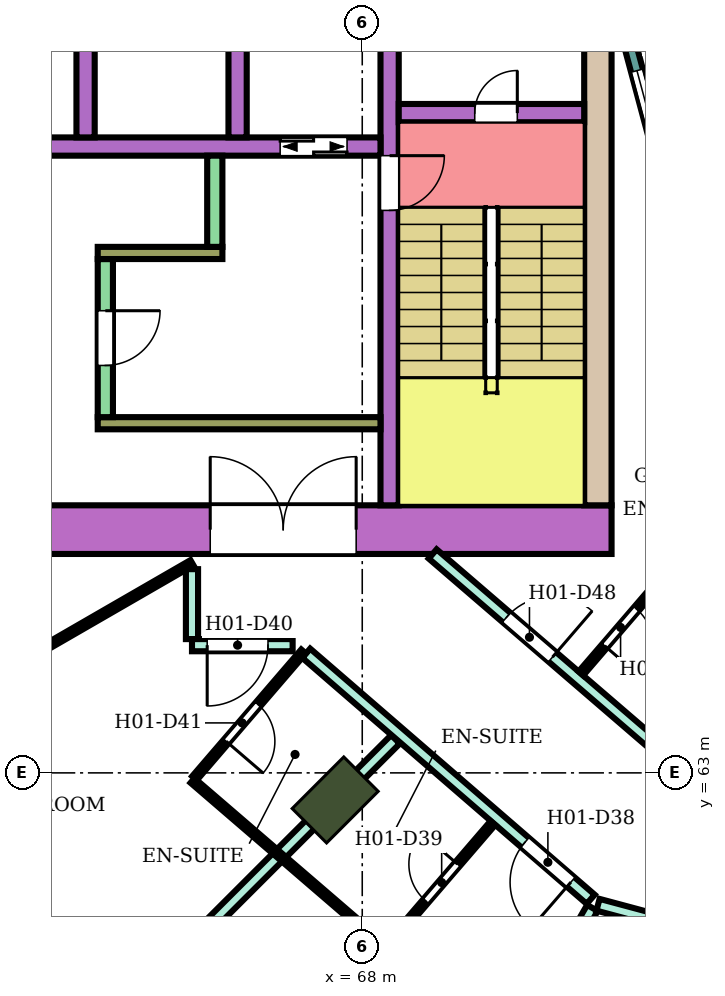
"""IFC4 building model, lengths in metres.
Left out: names, types, materials, properties, quantities, classifications, styles, units other than length and angle.
Written with IfcOpenShell. Run it as: python <this file> out.ifc"""

import sys

from ifc_helpers import new_model, si_unit, direction, frame, frame_2d, origin, origin_2d, place, context, subcontext, project, spatial, rectangle, extrude, element, fill, save


model = new_model("IFC4")
c1 = context("Model", 3, precision=1e-05, world=origin(), true_north=direction((0.0, 1.0)))
c2 = subcontext(c1, "Body", "Model", "MODEL_VIEW")
j1 = project(units=[si_unit("LENGTHUNIT", "METRE"), si_unit("PLANEANGLEUNIT", "RADIAN")], contexts=[c1])
p1 = place(None, origin())
s1 = spatial("IfcSite", under=j1, at=p1, CompositionType="ELEMENT")
p2 = place(p1, origin())
s2 = spatial("IfcBuilding", under=s1, at=p2, CompositionType="ELEMENT")
p3 = place(p2, frame((0.0, 0.0, 28.8)))
s3 = spatial("IfcBuildingStorey", under=s2, at=p3, CompositionType="ELEMENT", Elevation=28.8)
p4 = place(p3, frame((67.555, 62.555, 0.0), z_axis=(0.0, 0.0, 1.0), x_axis=(-0.707106781187, -0.707106781187, 0.0)))
e1 = element("IfcColumn", 1, at=p4, inside=s3, PredefinedType="COLUMN", context=c2, shape_type="SweptSolid", body=[
    extrude(rectangle(XDim=1.2, YDim=0.8, at=origin_2d()), origin(), (0.0, 0.0, 1.0), 3.8),
])
p5 = place(p3, frame((72.1, 67.0, 0.0), z_axis=(0.0, 0.0, 1.0), x_axis=(-1.0, 0.0, 0.0)))
e2 = element("IfcWall", 2, at=p5, inside=s3, PredefinedType="SHEAR", context=c2, shape_type="SweptSolid", body=[
    extrude(rectangle(XDim=14.7, YDim=0.8, at=frame_2d((7.35, 0.0))), origin(), (0.0, 0.0, 1.0), 3.48),
])
p6 = place(p5, frame((4.2, 0.0, 0.0)))
e3 = element("IfcOpeningElement", 3, at=p6, cuts=e2, PredefinedType="OPENING", context=c2, shape_type="SweptSolid", body=[
    extrude(rectangle(XDim=2.4, YDim=2.4, at=frame_2d((1.2, 1.2))), frame((0.0, 0.41, 0.0), z_axis=(0.0, -1.0, 0.0), x_axis=(1.0, 0.0, 0.0)), (0.0, 0.0, 1.0), 0.82),
])
p7 = place(p3, frame((71.875, 75.0, 0.0), z_axis=(0.0, 0.0, 1.0), x_axis=(0.0, -1.0, 0.0)))
e4 = element("IfcWall", 4, at=p7, inside=s3, PredefinedType="SHEAR", context=c2, shape_type="SweptSolid", body=[
    extrude(rectangle(XDim=7.6, YDim=0.45, at=frame_2d((3.8, 0.0))), origin(), (0.0, 0.0, 1.0), 3.48),
])
p8 = place(p3, frame((68.45, 75.0, 0.0), z_axis=(0.0, 0.0, 1.0), x_axis=(0.0, -1.0, 0.0)))
e5 = element("IfcWall", 5, at=p8, inside=s3, PredefinedType="SHEAR", context=c2, shape_type="SweptSolid", body=[
    extrude(rectangle(XDim=7.6, YDim=0.3, at=frame_2d((3.8, 0.0))), origin(), (0.0, 0.0, 1.0), 3.48),
])
p9 = place(p8, frame((1.85, 0.0, 0.0)))
e6 = element("IfcOpeningElement", 6, at=p9, cuts=e5, PredefinedType="OPENING", context=c2, shape_type="SweptSolid", body=[
    extrude(rectangle(XDim=0.9, YDim=2.1, at=frame_2d((0.45, 1.05))), frame((0.0, 0.16, 0.0), z_axis=(0.0, -1.0, 0.0), x_axis=(1.0, 0.0, 0.0)), (0.0, 0.0, 1.0), 0.32),
])
p10 = place(p3, frame((71.65, 73.85, 0.0), z_axis=(0.0, 0.0, 1.0), x_axis=(-1.0, 0.0, 0.0)))
e7 = element("IfcWall", 7, at=p10, inside=s3, PredefinedType="SHEAR", context=c2, shape_type="SweptSolid", body=[
    extrude(rectangle(XDim=3.05, YDim=0.3, at=frame_2d((1.525, 0.0))), origin(), (0.0, 0.0, 1.0), 3.48),
])
p11 = place(p10, frame((1.1, 0.0, 0.0)))
e8 = element("IfcOpeningElement", 8, at=p11, cuts=e7, PredefinedType="OPENING", context=c2, shape_type="SweptSolid", body=[
    extrude(rectangle(XDim=0.7, YDim=2.0, at=frame_2d((0.35, 1.0))), frame((0.0, 0.16, 0.0), z_axis=(0.0, -1.0, 0.0), x_axis=(1.0, 0.0, 0.0)), (0.0, 0.0, 1.0), 0.32),
])
p12 = place(p3, frame((68.3, 73.3, 0.0), z_axis=(0.0, 0.0, 1.0), x_axis=(-1.0, 0.0, 0.0)))
e9 = element("IfcWall", 9, at=p12, inside=s3, PredefinedType="SHEAR", context=c2, shape_type="SweptSolid", body=[
    extrude(rectangle(XDim=10.9, YDim=0.3, at=frame_2d((5.45, 0.0))), origin(), (0.0, 0.0, 1.0), 3.48),
])
p13 = place(p12, frame((0.55, 0.0, 0.0)))
e10 = element("IfcOpeningElement", 10, at=p13, cuts=e9, PredefinedType="OPENING", context=c2, shape_type="SweptSolid", body=[
    extrude(rectangle(XDim=1.1, YDim=2.1, at=frame_2d((0.55, 1.05))), frame((0.0, 0.16, 0.0), z_axis=(0.0, -1.0, 0.0), x_axis=(1.0, 0.0, 0.0)), (0.0, 0.0, 1.0), 0.32),
])
p14 = place(p12, frame((8.1, 0.0, 0.0)))
e11 = element("IfcOpeningElement", 11, at=p14, cuts=e9, PredefinedType="OPENING", context=c2, shape_type="SweptSolid", body=[
    extrude(rectangle(XDim=1.0, YDim=2.1, at=frame_2d((0.5, 1.05))), frame((0.0, 0.16, 0.0), z_axis=(0.0, -1.0, 0.0), x_axis=(1.0, 0.0, 0.0)), (0.0, 0.0, 1.0), 0.32),
])
for number, where, z_axis, x_axis in (
    (12, (65.95, 76.0, 0.0), (0.0, 0.0, 1.0), (0.0, -1.0, 0.0)),
    (13, (63.45, 76.0, 0.0), (0.0, 0.0, 1.0), (0.0, -1.0, 0.0)),
):
    element("IfcWall", number, at=place(p3, frame(where, z_axis=z_axis, x_axis=x_axis)), inside=s3, PredefinedType="SHEAR", context=c2, shape_type="SweptSolid", body=[
        extrude(rectangle(XDim=2.55, YDim=0.3, at=frame_2d((1.275, 0.0))), origin(), (0.0, 0.0, 1.0), 3.48),
    ])
p15 = place(p3, frame((68.3, 68.75, 0.0), z_axis=(0.0, 0.0, 1.0), x_axis=(-1.0, 0.0, 0.0)))
e14 = element("IfcWall", 14, at=p15, inside=s3, PredefinedType="SHEAR", context=c2, shape_type="SweptSolid", body=[
    extrude(rectangle(XDim=4.65, YDim=0.2, at=frame_2d((2.325, 0.0))), origin(), (0.0, 0.0, 1.0), 3.48),
])
p16 = place(p3, frame((63.775, 71.45, 0.0), z_axis=(0.0, 0.0, 1.0), x_axis=(0.0, -1.0, 0.0)))
e15 = element("IfcWall", 15, at=p16, inside=s3, PredefinedType="SHEAR", context=c2, shape_type="SweptSolid", body=[
    extrude(rectangle(XDim=2.6, YDim=0.25, at=frame_2d((1.3, 0.0))), origin(), (0.0, 0.0, 1.0), 3.48),
])
p17 = place(p16, frame((0.85, 0.0, 0.0)))
e16 = element("IfcOpeningElement", 16, at=p17, cuts=e15, PredefinedType="OPENING", context=c2, shape_type="SweptSolid", body=[
    extrude(rectangle(XDim=0.9, YDim=2.1, at=frame_2d((0.45, 1.05))), frame((0.0, 0.135, 0.0), z_axis=(0.0, -1.0, 0.0), x_axis=(1.0, 0.0, 0.0)), (0.0, 0.0, 1.0), 0.27),
])
p18 = place(p3, frame((65.7, 71.55, 0.0), z_axis=(0.0, 0.0, 1.0), x_axis=(-1.0, 0.0, 0.0)))
e17 = element("IfcWall", 17, at=p18, inside=s3, PredefinedType="SHEAR", context=c2, shape_type="SweptSolid", body=[
    extrude(rectangle(XDim=2.05, YDim=0.2, at=frame_2d((1.025, 0.0))), origin(), (0.0, 0.0, 1.0), 3.48),
])
p19 = place(p3, frame((65.575, 73.15, 0.0), z_axis=(0.0, 0.0, 1.0), x_axis=(0.0, -1.0, 0.0)))
e18 = element("IfcWall", 18, at=p19, inside=s3, PredefinedType="SHEAR", context=c2, shape_type="SweptSolid", body=[
    extrude(rectangle(XDim=1.5, YDim=0.25, at=frame_2d((0.75, 0.0))), origin(), (0.0, 0.0, 1.0), 3.48),
])
p20 = place(p3, frame((72.396, 75.0, 0.0), z_axis=(0.0, 0.0, 1.0), x_axis=(0.258789828301, -0.965933654434, 0.0)))
e19 = element("IfcWall", 19, at=p20, inside=s3, PredefinedType="NOTDEFINED", context=c2, shape_type="SweptSolid", body=[
    extrude(rectangle(XDim=3.936, YDim=0.2, at=frame_2d((1.968, 0.0))), origin(), (0.0, 0.0, 1.0), 3.8),
])
p21 = place(p20, frame((0.468, 0.0, 0.9)))
e20 = element("IfcOpeningElement", 20, at=p21, cuts=e19, PredefinedType="OPENING", context=c2, shape_type="SweptSolid", body=[
    extrude(rectangle(XDim=3.0, YDim=2.3, at=frame_2d((1.5, 1.15))), frame((0.0, 0.11, 0.0), z_axis=(0.0, -1.0, 0.0), x_axis=(1.0, 0.0, 0.0)), (0.0, 0.0, 1.0), 0.22),
])
p22 = place(p3, frame((63.592, 58.599, 0.0), z_axis=(0.0, 0.0, 1.0), x_axis=(0.707228748718, 0.706984792613, 0.0)))
e21 = element("IfcWall", 21, at=p22, inside=s3, PredefinedType="PARTITIONING", context=c2, shape_type="SweptSolid", body=[
    extrude(rectangle(XDim=7.005, YDim=0.2, at=frame_2d((3.503, 0.0))), origin(), (0.0, 0.0, 1.0), 3.35),
])
p23 = place(p3, frame((65.2, 65.2, 0.0), z_axis=(0.0, 0.0, 1.0), x_axis=(0.0, 1.0, 0.0)))
e22 = element("IfcWall", 22, at=p23, inside=s3, PredefinedType="PARTITIONING", context=c2, shape_type="SweptSolid", body=[
    extrude(rectangle(XDim=1.15, YDim=0.2, at=frame_2d((0.575, 0.0))), origin(), (0.0, 0.0, 1.0), 3.35),
])
p24 = place(p3, frame((65.2, 65.1, 0.0), z_axis=(0.0, 0.0, 1.0), x_axis=(1.0, 0.0, 0.0)))
e23 = element("IfcWall", 23, at=p24, inside=s3, PredefinedType="PARTITIONING", context=c2, shape_type="SweptSolid", body=[
    extrude(rectangle(XDim=1.655, YDim=0.2, at=frame_2d((0.828, 0.0))), origin(), (0.0, 0.0, 1.0), 3.35),
])
p25 = place(p24, frame((0.25, 0.0, 0.0)))
e24 = element("IfcOpeningElement", 24, at=p25, cuts=e23, PredefinedType="OPENING", context=c2, shape_type="SweptSolid", body=[
    extrude(rectangle(XDim=1.0, YDim=2.1, at=frame_2d((0.5, 1.05))), frame((0.0, 0.11, 0.0), z_axis=(0.0, -1.0, 0.0), x_axis=(1.0, 0.0, 0.0)), (0.0, 0.0, 1.0), 0.22),
])
p26 = place(p3, frame((67.078, 64.968, 0.0), z_axis=(0.0, 0.0, 1.0), x_axis=(0.756371089567, -0.654142778656, 0.0)))
e25 = element("IfcWall", 25, at=p26, inside=s3, PredefinedType="PARTITIONING", context=c2, shape_type="SweptSolid", body=[
    extrude(rectangle(XDim=6.185, YDim=0.2, at=frame_2d((3.093, 0.0))), origin(), (0.0, 0.0, 1.0), 3.35),
])
p27 = place(p26, frame((4.755, 0.0, 0.0)))
e26 = element("IfcOpeningElement", 26, at=p27, cuts=e25, PredefinedType="OPENING", context=c2, shape_type="SweptSolid", body=[
    extrude(rectangle(XDim=1.0, YDim=2.1, at=frame_2d((0.5, 1.05))), frame((0.0, 0.11, 0.0), z_axis=(0.0, -1.0, 0.0), x_axis=(1.0, 0.0, 0.0)), (0.0, 0.0, 1.0), 0.22),
])
p28 = place(p3, frame((67.096, 52.662, 0.0), z_axis=(0.0, 0.0, 1.0), x_axis=(0.500242450002, 0.865885379953, 0.0)))
e27 = element("IfcWall", 27, at=p28, inside=s3, PredefinedType="PARTITIONING", context=c2, shape_type="SweptSolid", body=[
    extrude(rectangle(XDim=9.374, YDim=0.2, at=frame_2d((4.687, 0.0))), origin(), (0.0, 0.0, 1.0), 3.35),
])
p29 = place(p3, frame((69.158, 66.6, 0.0), z_axis=(0.0, 0.0, 1.0), x_axis=(0.757976058094, -0.652282373943, 0.0)))
e28 = element("IfcWall", 28, at=p29, inside=s3, PredefinedType="PARTITIONING", context=c2, shape_type="SweptSolid", body=[
    extrude(rectangle(XDim=5.16, YDim=0.2, at=frame_2d((2.58, 0.0))), origin(), (0.0, 0.0, 1.0), 3.35),
])
p30 = place(p29, frame((1.6, 0.0, 0.0)))
e29 = element("IfcOpeningElement", 29, at=p30, cuts=e28, PredefinedType="OPENING", context=c2, shape_type="SweptSolid", body=[
    extrude(rectangle(XDim=1.0, YDim=2.1, at=frame_2d((0.5, 1.05))), frame((0.0, 0.11, 0.0), z_axis=(0.0, -1.0, 0.0), x_axis=(1.0, 0.0, 0.0)), (0.0, 0.0, 1.0), 0.22),
])
p31 = place(p3, frame((71.877, 60.831, 0.0), z_axis=(0.0, 0.0, 1.0), x_axis=(0.965852509869, -0.259092510851, 0.0)))
e30 = element("IfcWall", 30, at=p31, inside=s3, PredefinedType="PARTITIONING", context=c2, shape_type="SweptSolid", body=[
    extrude(rectangle(XDim=8.32, YDim=0.2, at=frame_2d((4.16, 0.0))), origin(), (0.0, 0.0, 1.0), 3.35),
])
p32 = place(p31, frame((6.86, 0.0, 0.0)))
e31 = element("IfcOpeningElement", 31, at=p32, cuts=e30, PredefinedType="OPENING", context=c2, shape_type="SweptSolid", body=[
    extrude(rectangle(XDim=1.0, YDim=2.1, at=frame_2d((0.5, 1.05))), frame((0.0, 0.11, 0.0), z_axis=(0.0, -1.0, 0.0), x_axis=(1.0, 0.0, 0.0)), (0.0, 0.0, 1.0), 0.22),
])
p33 = place(p3, frame((57.659, 62.101, 0.0), z_axis=(0.0, 0.0, 1.0), x_axis=(0.86602264145, 0.500004784474, 0.0)))
e32 = element("IfcWall", 32, at=p33, inside=s3, PredefinedType="PARTITIONING", context=c2, shape_type="SweptSolid", body=[
    extrude(rectangle(XDim=8.708, YDim=0.1, at=frame_2d((4.354, 0.0))), origin(), (0.0, 0.0, 1.0), 3.35),
])
p34 = place(p33, frame((3.929, 0.0, 0.0)))
e33 = element("IfcOpeningElement", 33, at=p34, cuts=e32, PredefinedType="OPENING", context=c2, shape_type="SweptSolid", body=[
    extrude(rectangle(XDim=0.9, YDim=2.1, at=frame_2d((0.45, 1.05))), frame((0.0, 0.06, 0.0), z_axis=(0.0, -1.0, 0.0), x_axis=(1.0, 0.0, 0.0)), (0.0, 0.0, 1.0), 0.12),
])
p35 = place(p3, frame((65.242, 62.912, 0.0), z_axis=(0.0, 0.0, 1.0), x_axis=(0.652069888227, 0.758158862553, 0.0)))
e34 = element("IfcWall", 34, at=p35, inside=s3, PredefinedType="PARTITIONING", context=c2, shape_type="SweptSolid", body=[
    extrude(rectangle(XDim=2.75, YDim=0.1, at=frame_2d((1.375, 0.0))), origin(), (0.0, 0.0, 1.0), 3.35),
])
p36 = place(p35, frame((0.8, 0.0, 0.0)))
e35 = element("IfcOpeningElement", 35, at=p36, cuts=e34, PredefinedType="OPENING", context=c2, shape_type="SweptSolid", body=[
    extrude(rectangle(XDim=0.8, YDim=2.1, at=frame_2d((0.4, 1.05))), frame((0.0, 0.06, 0.0), z_axis=(0.0, -1.0, 0.0), x_axis=(1.0, 0.0, 0.0)), (0.0, 0.0, 1.0), 0.12),
])
p37 = place(p3, frame((65.209, 62.875, 0.0), z_axis=(0.0, 0.0, 1.0), x_axis=(0.757930378138, -0.652335451969, 0.0)))
e36 = element("IfcWall", 36, at=p37, inside=s3, PredefinedType="PARTITIONING", context=c2, shape_type="SweptSolid", body=[
    extrude(rectangle(XDim=4.15, YDim=0.1, at=frame_2d((2.075, 0.0))), origin(), (0.0, 0.0, 1.0), 3.35),
])
p38 = place(p3, frame((68.393, 60.135, 0.0), z_axis=(0.0, 0.0, 1.0), x_axis=(0.652061182569, 0.758166349944, 0.0)))
e37 = element("IfcWall", 37, at=p38, inside=s3, PredefinedType="PARTITIONING", context=c2, shape_type="SweptSolid", body=[
    extrude(rectangle(XDim=2.69, YDim=0.1, at=frame_2d((1.345, 0.0))), origin(), (0.0, 0.0, 1.0), 3.35),
])
p39 = place(p38, frame((1.0, 0.0, 0.0)))
e38 = element("IfcOpeningElement", 38, at=p39, cuts=e37, PredefinedType="OPENING", context=c2, shape_type="SweptSolid", body=[
    extrude(rectangle(XDim=0.8, YDim=2.1, at=frame_2d((0.4, 1.05))), frame((0.0, 0.06, 0.0), z_axis=(0.0, -1.0, 0.0), x_axis=(1.0, 0.0, 0.0)), (0.0, 0.0, 1.0), 0.12),
])
p40 = place(p3, frame((71.596, 64.635, 0.0), z_axis=(0.0, 0.0, 1.0), x_axis=(0.652285007511, 0.757973791748, 0.0)))
e39 = element("IfcWall", 39, at=p40, inside=s3, PredefinedType="PARTITIONING", context=c2, shape_type="SweptSolid", body=[
    extrude(rectangle(XDim=2.65, YDim=0.1, at=frame_2d((1.325, 0.0))), origin(), (0.0, 0.0, 1.0), 3.35),
])
p41 = place(p40, frame((0.6, 0.0, 0.0)))
e40 = element("IfcOpeningElement", 40, at=p41, cuts=e39, PredefinedType="OPENING", context=c2, shape_type="SweptSolid", body=[
    extrude(rectangle(XDim=0.8, YDim=2.1, at=frame_2d((0.4, 1.05))), frame((0.0, 0.06, 0.0), z_axis=(0.0, -1.0, 0.0), x_axis=(1.0, 0.0, 0.0)), (0.0, 0.0, 1.0), 0.12),
])
p42 = place(p21, origin())
e41 = element("IfcWindow", 41, at=p42, inside=s3, PartitioningType="SINGLE_PANEL", PredefinedType="WINDOW", context=c2, shape_type="SweptSolid", body=[
    extrude(rectangle(XDim=3.0, YDim=2.3, at=frame_2d((1.5, 1.15))), frame((0.0, 0.03, 0.0), z_axis=(0.0, -1.0, 0.0), x_axis=(1.0, 0.0, 0.0)), (0.0, 0.0, 1.0), 0.06),
])
fill(e20, e41)
p43 = place(p27, frame((1.0, 0.0, 0.0), z_axis=(0.0, 0.0, 1.0), x_axis=(-1.0, 0.0, 0.0)))
e42 = element("IfcDoor", 42, at=p43, inside=s3, OperationType="SINGLE_SWING_LEFT", PredefinedType="DOOR", context=c2, shape_type="SweptSolid", body=[
    extrude(rectangle(XDim=1.0, YDim=2.1, at=frame_2d((0.5, 1.05))), frame((0.0, 0.025, 0.0), z_axis=(0.0, -1.0, 0.0), x_axis=(1.0, 0.0, 0.0)), (0.0, 0.0, 1.0), 0.05),
])
fill(e26, e42)
p44 = place(p39, origin())
e43 = element("IfcDoor", 43, at=p44, inside=s3, OperationType="SINGLE_SWING_RIGHT", PredefinedType="DOOR", context=c2, shape_type="SweptSolid", body=[
    extrude(rectangle(XDim=0.8, YDim=2.1, at=frame_2d((0.4, 1.05))), frame((0.0, 0.025, 0.0), z_axis=(0.0, -1.0, 0.0), x_axis=(1.0, 0.0, 0.0)), (0.0, 0.0, 1.0), 0.05),
])
fill(e38, e43)
p45 = place(p25, frame((1.0, 0.0, 0.0), z_axis=(0.0, 0.0, 1.0), x_axis=(-1.0, 0.0, 0.0)))
e44 = element("IfcDoor", 44, at=p45, inside=s3, OperationType="SINGLE_SWING_RIGHT", PredefinedType="DOOR", context=c2, shape_type="SweptSolid", body=[
    extrude(rectangle(XDim=1.0, YDim=2.1, at=frame_2d((0.5, 1.05))), frame((0.0, 0.025, 0.0), z_axis=(0.0, -1.0, 0.0), x_axis=(1.0, 0.0, 0.0)), (0.0, 0.0, 1.0), 0.05),
])
fill(e24, e44)
p46 = place(p36, frame((0.8, 0.0, 0.0), z_axis=(0.0, 0.0, 1.0), x_axis=(-1.0, 0.0, 0.0)))
e45 = element("IfcDoor", 45, at=p46, inside=s3, OperationType="SINGLE_SWING_RIGHT", PredefinedType="DOOR", context=c2, shape_type="SweptSolid", body=[
    extrude(rectangle(XDim=0.8, YDim=2.1, at=frame_2d((0.4, 1.05))), frame((0.0, 0.025, 0.0), z_axis=(0.0, -1.0, 0.0), x_axis=(1.0, 0.0, 0.0)), (0.0, 0.0, 1.0), 0.05),
])
fill(e35, e45)
p47 = place(p30, origin())
e46 = element("IfcDoor", 46, at=p47, inside=s3, OperationType="SINGLE_SWING_RIGHT", PredefinedType="DOOR", context=c2, shape_type="SweptSolid", body=[
    extrude(rectangle(XDim=1.0, YDim=2.1, at=frame_2d((0.5, 1.05))), frame((0.0, 0.025, 0.0), z_axis=(0.0, -1.0, 0.0), x_axis=(1.0, 0.0, 0.0)), (0.0, 0.0, 1.0), 0.05),
])
fill(e29, e46)
p48 = place(p41, frame((0.8, 0.0, 0.0), z_axis=(0.0, 0.0, 1.0), x_axis=(-1.0, 0.0, 0.0)))
e47 = element("IfcDoor", 47, at=p48, inside=s3, OperationType="SINGLE_SWING_RIGHT", PredefinedType="DOOR", context=c2, shape_type="SweptSolid", body=[
    extrude(rectangle(XDim=0.8, YDim=2.1, at=frame_2d((0.4, 1.05))), frame((0.0, 0.025, 0.0), z_axis=(0.0, -1.0, 0.0), x_axis=(1.0, 0.0, 0.0)), (0.0, 0.0, 1.0), 0.05),
])
fill(e40, e47)
p49 = place(p11, frame((0.7, 0.0, 0.0), z_axis=(0.0, 0.0, 1.0), x_axis=(-1.0, 0.0, 0.0)))
e48 = element("IfcDoor", 48, at=p49, inside=s3, OperationType="SINGLE_SWING_RIGHT", PredefinedType="DOOR", context=c2, shape_type="SweptSolid", body=[
    extrude(rectangle(XDim=0.7, YDim=2.0, at=frame_2d((0.35, 1.0))), frame((0.0, 0.025, 0.0), z_axis=(0.0, -1.0, 0.0), x_axis=(1.0, 0.0, 0.0)), (0.0, 0.0, 1.0), 0.05),
])
fill(e8, e48)
p50 = place(p9, origin())
e49 = element("IfcDoor", 49, at=p50, inside=s3, OperationType="SINGLE_SWING_LEFT", PredefinedType="DOOR", context=c2, shape_type="SweptSolid", body=[
    extrude(rectangle(XDim=0.9, YDim=2.1, at=frame_2d((0.45, 1.05))), frame((0.0, 0.025, 0.0), z_axis=(0.0, -1.0, 0.0), x_axis=(1.0, 0.0, 0.0)), (0.0, 0.0, 1.0), 0.05),
])
fill(e6, e49)
p51 = place(p13, origin())
e50 = element("IfcDoor", 50, at=p51, inside=s3, OperationType="DOUBLE_DOOR_SLIDING", PredefinedType="DOOR", context=c2, shape_type="SweptSolid", body=[
    extrude(rectangle(XDim=1.1, YDim=2.1, at=frame_2d((0.55, 1.05))), frame((0.0, 0.025, 0.0), z_axis=(0.0, -1.0, 0.0), x_axis=(1.0, 0.0, 0.0)), (0.0, 0.0, 1.0), 0.05),
])
fill(e10, e50)
p52 = place(p17, origin())
e51 = element("IfcDoor", 51, at=p52, inside=s3, OperationType="SINGLE_SWING_LEFT", PredefinedType="DOOR", context=c2, shape_type="SweptSolid", body=[
    extrude(rectangle(XDim=0.9, YDim=2.1, at=frame_2d((0.45, 1.05))), frame((0.0, 0.025, 0.0), z_axis=(0.0, -1.0, 0.0), x_axis=(1.0, 0.0, 0.0)), (0.0, 0.0, 1.0), 0.05),
])
fill(e16, e51)
p53 = place(p6, frame((2.4, 0.0, 0.0), z_axis=(0.0, 0.0, 1.0), x_axis=(-1.0, 0.0, 0.0)))
e52 = element("IfcDoor", 52, at=p53, inside=s3, OperationType="DOUBLE_DOOR_SINGLE_SWING", PredefinedType="DOOR", context=c2, shape_type="SweptSolid", body=[
    extrude(rectangle(XDim=2.4, YDim=2.4, at=frame_2d((1.2, 1.2))), frame((0.0, 0.025, 0.0), z_axis=(0.0, -1.0, 0.0), x_axis=(1.0, 0.0, 0.0)), (0.0, 0.0, 1.0), 0.05),
])
fill(e3, e52)
save(model, sys.argv[1])
